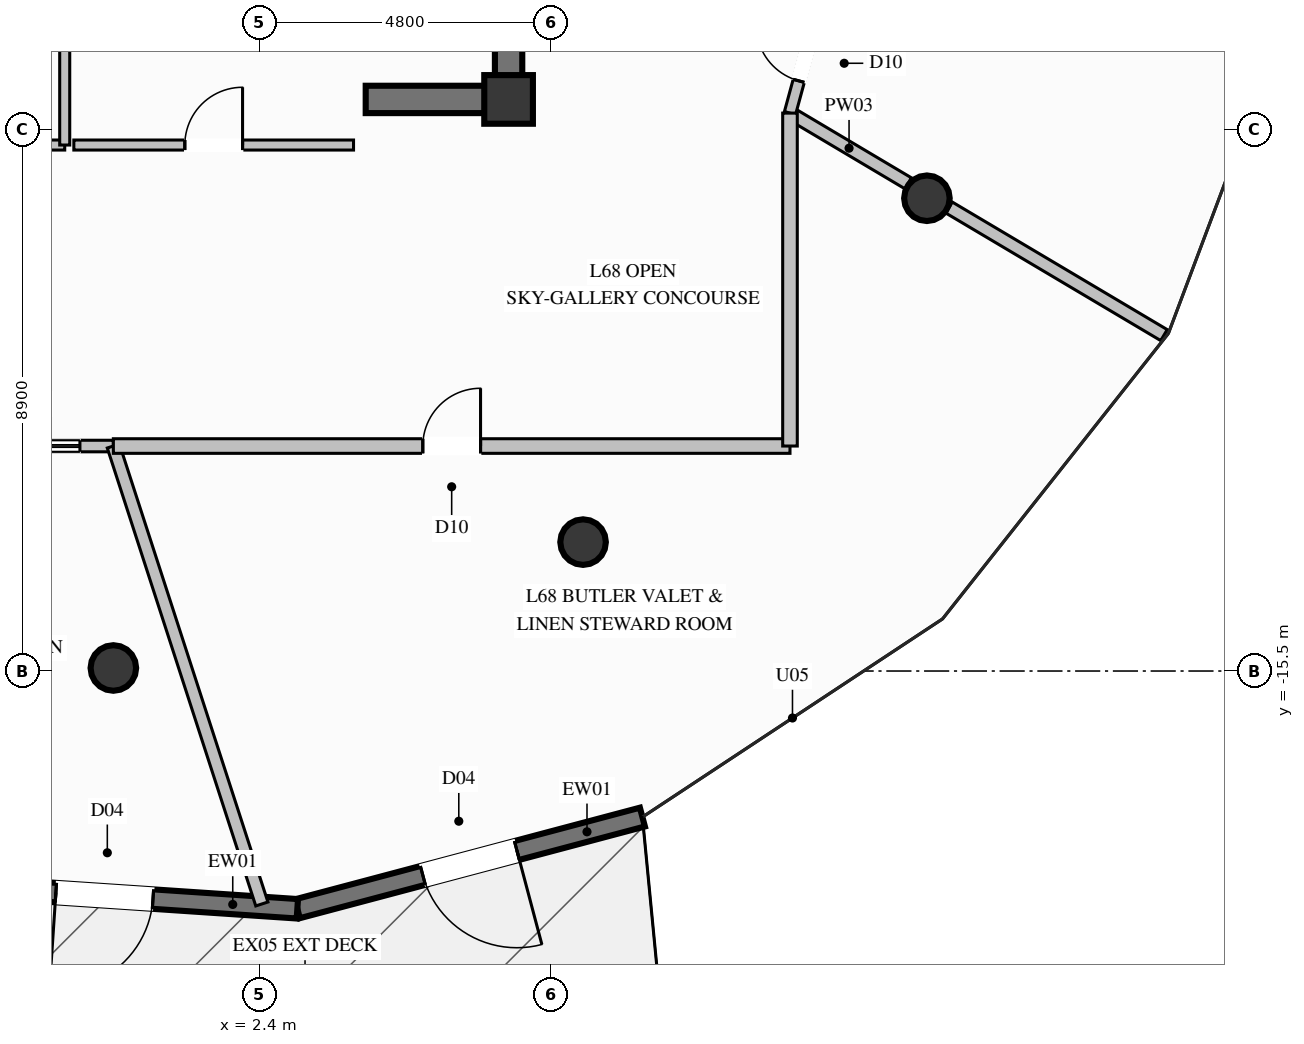
"""IFC4 building model, lengths in metres.
Left out: names, types, materials, properties, quantities, classifications, styles, units other than length and angle.
Written with IfcOpenShell. Run it as: python <this file> out.ifc"""

import sys

from ifc_helpers import new_model, si_unit, direction, frame, frame_2d, origin, origin_2d, place, context, subcontext, project, spatial, rectangle, circle, extrude, element, fill, save


model = new_model("IFC4")
c1 = context("Model", 3, precision=1e-05, world=origin(), true_north=direction((0.0, 1.0)))
c2 = subcontext(c1, "Body", "Model", "MODEL_VIEW")
j1 = project(units=[si_unit("LENGTHUNIT", "METRE"), si_unit("PLANEANGLEUNIT", "RADIAN")], contexts=[c1])
p1 = place(None, origin())
s1 = spatial("IfcSite", under=j1, at=p1, CompositionType="ELEMENT")
p2 = place(p1, origin())
s2 = spatial("IfcBuilding", under=s1, at=p2, CompositionType="ELEMENT")
p3 = place(p2, frame((0.0, 0.0, 262.0)))
s3 = spatial("IfcBuildingStorey", under=s2, at=p3, CompositionType="ELEMENT", Elevation=262.0)
p4 = place(p3, frame((6.5, -6.1, 0.0), z_axis=(0.0, 0.0, 1.0), x_axis=(1.0, 0.0, 0.0)))
e1 = element("IfcColumn", 1, at=p4, inside=s3, PredefinedType="COLUMN", context=c2, shape_type="SweptSolid", body=[
    extrude(rectangle(XDim=0.8, YDim=0.8, at=origin_2d()), origin(), (0.0, 0.0, 1.0), 4.8),
])
p5 = place(p3, frame((4.15, -6.1, 0.0), z_axis=(0.0, 0.0, 1.0), x_axis=(1.0, 0.0, 0.0)))
e2 = element("IfcWall", 2, at=p5, inside=s3, PredefinedType="SHEAR", context=c2, shape_type="SweptSolid", body=[
    extrude(rectangle(XDim=2.125, YDim=0.45, at=frame_2d((1.062, 0.0))), origin(), (0.0, 0.0, 1.0), 4.8),
])
p6 = place(p3, frame((6.5, -6.325, 0.0), z_axis=(0.0, 0.0, 1.0), x_axis=(0.0, 1.0, 0.0)))
e3 = element("IfcWall", 3, at=p6, inside=s3, PredefinedType="SHEAR", context=c2, shape_type="SweptSolid", body=[
    extrude(rectangle(XDim=3.975, YDim=0.45, at=frame_2d((1.987, 0.0))), origin(), (0.0, 0.0, 1.0), 4.8),
])
for number, where, z_axis, x_axis in (
    (4, (0.0, -15.45, 0.0), (0.0, 0.0, 1.0), (1.0, 0.0, 0.0)),
    (5, (7.725, -13.38, 0.0), (0.0, 0.0, 1.0), (1.0, 0.0, 0.0)),
    (6, (13.38, -7.725, 0.0), (0.0, 0.0, 1.0), (1.0, 0.0, 0.0)),
):
    element("IfcColumn", number, at=place(p3, frame(where, z_axis=z_axis, x_axis=x_axis)), inside=s3, PredefinedType="COLUMN", context=c2, shape_type="SweptSolid", body=[
        extrude(circle(Radius=0.375, at=origin_2d()), origin(), (0.0, 0.0, 1.0), 4.8),
    ])
p7 = place(p3, frame((8.701, -17.902, 0.0), z_axis=(0.0, 0.0, 1.0), x_axis=(-0.966469167261, -0.256782687761, 0.0)))
e7 = element("IfcWall", 7, at=p7, inside=s3, PredefinedType="SOLIDWALL", context=c2, shape_type="SweptSolid", body=[
    extrude(rectangle(XDim=5.872, YDim=0.32, at=frame_2d((2.936, 0.0))), origin(), (0.0, 0.0, 1.0), 4.57),
])
p8 = place(p7, frame((2.136, 0.0, 0.0)))
e8 = element("IfcOpeningElement", 8, at=p8, cuts=e7, PredefinedType="OPENING", context=c2, shape_type="SweptSolid", body=[
    extrude(rectangle(XDim=1.6, YDim=2.3, at=frame_2d((0.8, 1.15))), frame((0.0, 0.17, 0.0), z_axis=(0.0, -1.0, 0.0), x_axis=(1.0, 0.0, 0.0)), (0.0, 0.0, 1.0), 0.34),
])
p9 = place(p3, frame((3.026, -19.41, 0.0), z_axis=(0.0, 0.0, 1.0), x_axis=(-0.997759882604, 0.066897060218, 0.0)))
e9 = element("IfcWall", 9, at=p9, inside=s3, PredefinedType="SOLIDWALL", context=c2, shape_type="SweptSolid", body=[
    extrude(rectangle(XDim=5.872, YDim=0.32, at=frame_2d((2.936, 0.0))), origin(), (0.0, 0.0, 1.0), 4.57),
])
p10 = place(p9, frame((2.38, 0.0, 0.0)))
e10 = element("IfcOpeningElement", 10, at=p10, cuts=e9, PredefinedType="OPENING", context=c2, shape_type="SweptSolid", body=[
    extrude(rectangle(XDim=1.6, YDim=2.3, at=frame_2d((0.8, 1.15))), frame((0.0, 0.17, 0.0), z_axis=(0.0, -1.0, 0.0), x_axis=(1.0, 0.0, 0.0)), (0.0, 0.0, 1.0), 0.34),
])
p11 = place(p3, frame((-5.7, -6.85, 0.0), z_axis=(0.0, 0.0, 1.0), x_axis=(1.0, 0.0, 0.0)))
e11 = element("IfcWall", 11, at=p11, inside=s3, PredefinedType="PARTITIONING", context=c2, shape_type="SweptSolid", body=[
    extrude(rectangle(XDim=4.9, YDim=0.165, at=frame_2d((2.45, 0.0))), origin(), (0.0, 0.0, 1.0), 3.455),
])
p12 = place(p11, frame((1.975, 0.0, 0.0)))
e12 = element("IfcOpeningElement", 12, at=p12, cuts=e11, PredefinedType="OPENING", context=c2, shape_type="SweptSolid", body=[
    extrude(rectangle(XDim=0.95, YDim=2.1, at=frame_2d((0.475, 1.05))), frame((0.0, 0.093, 0.0), z_axis=(0.0, -1.0, 0.0), x_axis=(1.0, 0.0, 0.0)), (0.0, 0.0, 1.0), 0.185),
])
p13 = place(p3, frame((-0.8, -6.85, 0.0), z_axis=(0.0, 0.0, 1.0), x_axis=(0.0, 1.0, 0.0)))
e13 = element("IfcWall", 13, at=p13, inside=s3, PredefinedType="PARTITIONING", context=c2, shape_type="SweptSolid", body=[
    extrude(rectangle(XDim=3.35, YDim=0.165, at=frame_2d((1.675, 0.0))), origin(), (0.0, 0.0, 1.0), 4.57),
])
p14 = place(p3, frame((-0.65, -6.85, 0.0), z_axis=(0.0, 0.0, 1.0), x_axis=(1.0, 0.0, 0.0)))
e14 = element("IfcWall", 14, at=p14, inside=s3, PredefinedType="PARTITIONING", context=c2, shape_type="SweptSolid", body=[
    extrude(rectangle(XDim=4.6, YDim=0.165, at=frame_2d((2.3, 0.0))), origin(), (0.0, 0.0, 1.0), 3.455),
])
p15 = place(p14, frame((1.825, 0.0, 0.0)))
e15 = element("IfcOpeningElement", 15, at=p15, cuts=e14, PredefinedType="OPENING", context=c2, shape_type="SweptSolid", body=[
    extrude(rectangle(XDim=0.95, YDim=2.1, at=frame_2d((0.475, 1.05))), frame((0.0, 0.093, 0.0), z_axis=(0.0, -1.0, 0.0), x_axis=(1.0, 0.0, 0.0)), (0.0, 0.0, 1.0), 0.185),
])
p16 = place(p3, frame((11.128, -6.325, 0.0), z_axis=(0.0, 0.0, 1.0), x_axis=(0.859791012607, -0.510646075712, 0.0)))
e16 = element("IfcWall", 16, at=p16, inside=s3, PredefinedType="PARTITIONING", context=c2, shape_type="SweptSolid", body=[
    extrude(rectangle(XDim=2.26, YDim=0.21, at=frame_2d((1.13, 0.0))), origin(), (0.0, 0.0, 1.0), 4.011),
])
p17 = place(p3, frame((13.744, -7.878, 0.0), z_axis=(0.0, 0.0, 1.0), x_axis=(0.859945978339, -0.510385064768, 0.0)))
e17 = element("IfcWall", 17, at=p17, inside=s3, PredefinedType="PARTITIONING", context=c2, shape_type="SweptSolid", body=[
    extrude(rectangle(XDim=4.111, YDim=0.21, at=frame_2d((2.055, 0.0))), origin(), (0.0, 0.0, 1.0), 4.57),
])
p18 = place(p3, frame((11.128, -6.325, 0.0), z_axis=(0.0, 0.0, 1.0), x_axis=(0.262717156474, 0.964872890952, 0.0)))
e18 = element("IfcWall", 18, at=p18, inside=s3, PredefinedType="PARTITIONING", context=c2, shape_type="SweptSolid", body=[
    extrude(rectangle(XDim=6.555, YDim=0.19, at=frame_2d((3.278, 0.0))), origin(), (0.0, 0.0, 1.0), 4.57),
])
p19 = place(p18, frame((0.55, 0.0, 0.0)))
e19 = element("IfcOpeningElement", 19, at=p19, cuts=e18, PredefinedType="OPENING", context=c2, shape_type="SweptSolid", body=[
    extrude(rectangle(XDim=0.95, YDim=2.1, at=frame_2d((0.475, 1.05))), frame((0.0, 0.105, 0.0), z_axis=(0.0, -1.0, 0.0), x_axis=(1.0, 0.0, 0.0)), (0.0, 0.0, 1.0), 0.21),
])
p20 = place(p18, frame((4.405, 0.0, 0.9)))
e20 = element("IfcOpeningElement", 20, at=p20, cuts=e18, PredefinedType="OPENING", context=c2, shape_type="SweptSolid", body=[
    extrude(rectangle(XDim=1.6, YDim=1.4, at=frame_2d((0.8, 0.7))), frame((0.0, 0.105, 0.0), z_axis=(0.0, -1.0, 0.0), x_axis=(1.0, 0.0, 0.0)), (0.0, 0.0, 1.0), 0.21),
])
p21 = place(p3, frame((-11.128, -11.8, 0.0), z_axis=(0.0, 0.0, 1.0), x_axis=(1.0, 0.0, 0.0)))
e21 = element("IfcWall", 21, at=p21, inside=s3, PredefinedType="PARTITIONING", context=c2, shape_type="SweptSolid", body=[
    extrude(rectangle(XDim=11.128, YDim=0.19, at=frame_2d((5.564, 0.0))), origin(), (0.0, 0.0, 1.0), 4.57),
])
p22 = place(p21, frame((0.55, 0.0, 0.0)))
e22 = element("IfcOpeningElement", 22, at=p22, cuts=e21, PredefinedType="OPENING", context=c2, shape_type="SweptSolid", body=[
    extrude(rectangle(XDim=0.95, YDim=2.1, at=frame_2d((0.475, 1.05))), frame((0.0, 0.105, 0.0), z_axis=(0.0, -1.0, 0.0), x_axis=(1.0, 0.0, 0.0)), (0.0, 0.0, 1.0), 0.21),
])
p23 = place(p21, frame((8.978, 0.0, 0.9)))
e23 = element("IfcOpeningElement", 23, at=p23, cuts=e21, PredefinedType="OPENING", context=c2, shape_type="SweptSolid", body=[
    extrude(rectangle(XDim=1.6, YDim=1.4, at=frame_2d((0.8, 0.7))), frame((0.0, 0.105, 0.0), z_axis=(0.0, -1.0, 0.0), x_axis=(1.0, 0.0, 0.0)), (0.0, 0.0, 1.0), 0.21),
])
p24 = place(p3, frame((0.0, -11.8, 0.0), z_axis=(0.0, 0.0, 1.0), x_axis=(0.308436826184, -0.951244828766, 0.0)))
e24 = element("IfcWall", 24, at=p24, inside=s3, PredefinedType="PARTITIONING", context=c2, shape_type="SweptSolid", body=[
    extrude(rectangle(XDim=7.917, YDim=0.21, at=frame_2d((3.958, 0.0))), origin(), (0.0, 0.0, 1.0), 4.57),
])
p25 = place(p3, frame((0.0, -11.8, 0.0), z_axis=(0.0, 0.0, 1.0), x_axis=(1.0, 0.0, 0.0)))
e25 = element("IfcWall", 25, at=p25, inside=s3, PredefinedType="PARTITIONING", context=c2, shape_type="SweptSolid", body=[
    extrude(rectangle(XDim=11.128, YDim=0.24, at=frame_2d((5.564, 0.0))), origin(), (0.0, 0.0, 1.0), 4.57),
])
p26 = place(p25, frame((5.089, 0.0, 0.0)))
e26 = element("IfcOpeningElement", 26, at=p26, cuts=e25, PredefinedType="OPENING", context=c2, shape_type="SweptSolid", body=[
    extrude(rectangle(XDim=0.95, YDim=2.1, at=frame_2d((0.475, 1.05))), frame((0.0, 0.13, 0.0), z_axis=(0.0, -1.0, 0.0), x_axis=(1.0, 0.0, 0.0)), (0.0, 0.0, 1.0), 0.26),
])
p27 = place(p3, frame((11.128, -11.8, 0.0), z_axis=(0.0, 0.0, 1.0), x_axis=(0.0, 1.0, 0.0)))
e27 = element("IfcWall", 27, at=p27, inside=s3, PredefinedType="PARTITIONING", context=c2, shape_type="SweptSolid", body=[
    extrude(rectangle(XDim=5.475, YDim=0.24, at=frame_2d((2.738, 0.0))), origin(), (0.0, 0.0, 1.0), 4.57),
])
p28 = place(p8, origin())
e28 = element("IfcDoor", 28, at=p28, inside=s3, OperationType="SINGLE_SWING_LEFT", PredefinedType="DOOR", context=c2, shape_type="SweptSolid", body=[
    extrude(rectangle(XDim=1.6, YDim=2.3, at=frame_2d((0.8, 1.15))), frame((0.0, 0.025, 0.0), z_axis=(0.0, -1.0, 0.0), x_axis=(1.0, 0.0, 0.0)), (0.0, 0.0, 1.0), 0.05),
])
fill(e8, e28)
p29 = place(p10, origin())
e29 = element("IfcDoor", 29, at=p29, inside=s3, OperationType="SINGLE_SWING_RIGHT", PredefinedType="DOOR", context=c2, shape_type="SweptSolid", body=[
    extrude(rectangle(XDim=1.6, YDim=2.3, at=frame_2d((0.8, 1.15))), frame((0.0, 0.025, 0.0), z_axis=(0.0, -1.0, 0.0), x_axis=(1.0, 0.0, 0.0)), (0.0, 0.0, 1.0), 0.05),
])
fill(e10, e29)
p30 = place(p15, origin())
e30 = element("IfcDoor", 30, at=p30, inside=s3, OperationType="SINGLE_SWING_RIGHT", PredefinedType="DOOR", context=c2, shape_type="SweptSolid", body=[
    extrude(rectangle(XDim=0.95, YDim=2.1, at=frame_2d((0.475, 1.05))), frame((0.0, 0.025, 0.0), z_axis=(0.0, -1.0, 0.0), x_axis=(1.0, 0.0, 0.0)), (0.0, 0.0, 1.0), 0.05),
])
fill(e15, e30)
p31 = place(p19, origin())
e31 = element("IfcDoor", 31, at=p31, inside=s3, OperationType="SINGLE_SWING_RIGHT", PredefinedType="DOOR", context=c2, shape_type="SweptSolid", body=[
    extrude(rectangle(XDim=0.95, YDim=2.1, at=frame_2d((0.475, 1.05))), frame((0.0, 0.025, 0.0), z_axis=(0.0, -1.0, 0.0), x_axis=(1.0, 0.0, 0.0)), (0.0, 0.0, 1.0), 0.05),
])
fill(e19, e31)
p32 = place(p23, origin())
e32 = element("IfcWindow", 32, at=p32, inside=s3, PartitioningType="SINGLE_PANEL", PredefinedType="WINDOW", context=c2, shape_type="SweptSolid", body=[
    extrude(rectangle(XDim=1.6, YDim=1.4, at=frame_2d((0.8, 0.7))), frame((0.0, 0.03, 0.0), z_axis=(0.0, -1.0, 0.0), x_axis=(1.0, 0.0, 0.0)), (0.0, 0.0, 1.0), 0.06),
])
fill(e23, e32)
p33 = place(p26, origin())
e33 = element("IfcDoor", 33, at=p33, inside=s3, OperationType="SINGLE_SWING_RIGHT", PredefinedType="DOOR", context=c2, shape_type="SweptSolid", body=[
    extrude(rectangle(XDim=0.95, YDim=2.1, at=frame_2d((0.475, 1.05))), frame((0.0, 0.025, 0.0), z_axis=(0.0, -1.0, 0.0), x_axis=(1.0, 0.0, 0.0)), (0.0, 0.0, 1.0), 0.05),
])
fill(e26, e33)
save(model, sys.argv[1])
